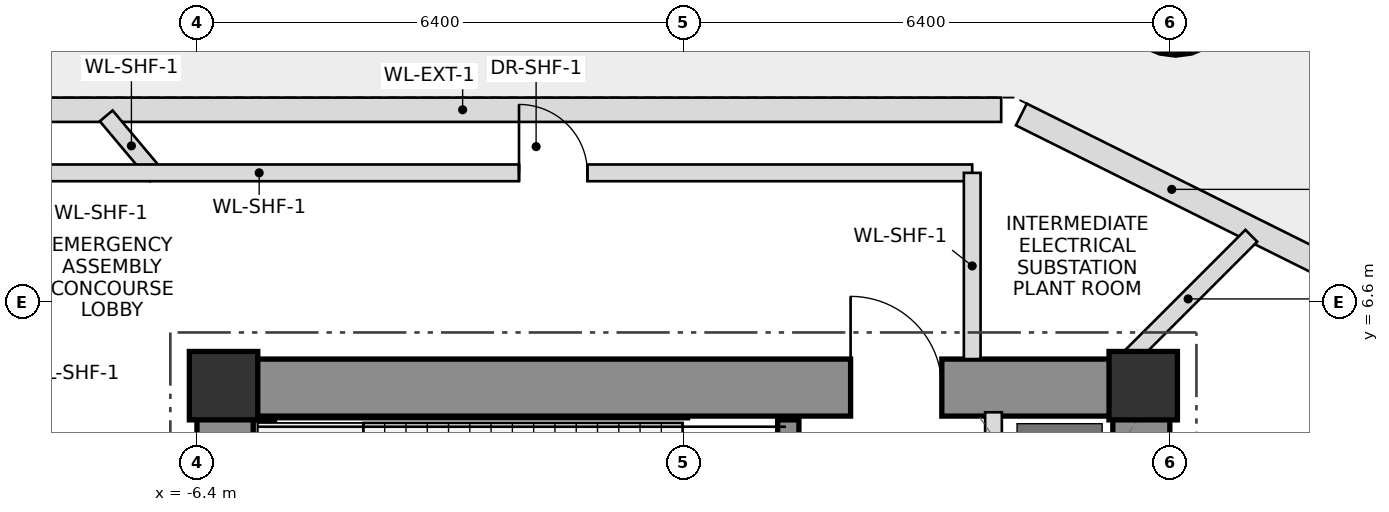
"""IFC4 building model, lengths in metres.
Left out: names, types, materials, properties, quantities, classifications, styles, units other than length and angle.
Written with IfcOpenShell. Run it as: python <this file> out.ifc"""

import sys

from ifc_helpers import new_model, si_unit, direction, frame, frame_2d, origin, origin_2d, place, context, subcontext, project, spatial, rectangle, hollow_circle, extrude, source, transform, mapped, element, fill, save


model = new_model("IFC4")
c1 = context("Model", 3, precision=1e-05, world=origin(), true_north=direction((0.0, 1.0)))
c2 = subcontext(c1, "Body", "Model", "MODEL_VIEW")
j1 = project(units=[si_unit("LENGTHUNIT", "METRE"), si_unit("PLANEANGLEUNIT", "RADIAN")], contexts=[c1])
p1 = place(None, origin())
s1 = spatial("IfcSite", under=j1, at=p1, CompositionType="ELEMENT")
p2 = place(p1, origin())
s2 = spatial("IfcBuilding", under=s1, at=p2, CompositionType="ELEMENT")
p3 = place(p2, frame((0.0, 0.0, 49.7)))
s3 = spatial("IfcBuildingStorey", under=s2, at=p3, CompositionType="ELEMENT", Elevation=49.7)
m1 = source(origin(), c2, "Body", "SweptSolid", [
    extrude(rectangle(XDim=0.9, YDim=0.9, at=origin_2d()), origin(), (0.0, 0.0, 1.0), 5.1),
])
for number, where, z_axis, x_axis in (
    (1, (6.05, 5.5, 0.0), (0.0, 0.0, 1.0), (1.0, 0.0, 0.0)),
    (2, (-6.05, 5.5, 0.0), (0.0, 0.0, 1.0), (1.0, 0.0, 0.0)),
):
    element("IfcColumn", number, at=place(p3, frame(where, z_axis=z_axis, x_axis=x_axis)), inside=s3, PredefinedType="COLUMN", context=c2, shape_type="MappedRepresentation", body=[
        mapped(m1, transform((0.0, 0.0, 0.0), scale=1.0)),
    ])
p4 = place(p3, frame((-6.4, 5.475, 0.0), z_axis=(0.0, 0.0, 1.0), x_axis=(1.0, 0.0, 0.0)))
e3 = element("IfcWall", 3, at=p4, inside=s3, PredefinedType="SHEAR", context=c2, shape_type="SweptSolid", body=[
    extrude(rectangle(XDim=12.8, YDim=0.75, at=frame_2d((6.4, 0.0))), origin(), (0.0, 0.0, 1.0), 5.1),
])
p5 = place(p4, frame((8.6, 0.0, 0.0)))
e4 = element("IfcOpeningElement", 4, at=p5, cuts=e3, PredefinedType="OPENING", context=c2, shape_type="SweptSolid", body=[
    extrude(rectangle(XDim=1.2, YDim=2.2, at=frame_2d((0.6, 1.1))), frame((0.0, 0.385, 0.0), z_axis=(0.0, -1.0, 0.0), x_axis=(1.0, 0.0, 0.0)), (0.0, 0.0, 1.0), 0.77),
])
p6 = place(p3, frame((6.025, -5.1, 0.0), z_axis=(0.0, 0.0, 1.0), x_axis=(0.0, 1.0, 0.0)))
e5 = element("IfcWall", 5, at=p6, inside=s3, PredefinedType="SHEAR", context=c2, shape_type="SweptSolid", body=[
    extrude(rectangle(XDim=10.2, YDim=0.75, at=frame_2d((5.1, 0.0))), origin(), (0.0, 0.0, 1.0), 5.1),
])
p7 = place(p3, frame((-6.025, 1.75, 0.0), z_axis=(0.0, 0.0, 1.0), x_axis=(0.0, 1.0, 0.0)))
e6 = element("IfcWall", 6, at=p7, inside=s3, PredefinedType="SHEAR", context=c2, shape_type="SweptSolid", body=[
    extrude(rectangle(XDim=3.35, YDim=0.75, at=frame_2d((1.675, 0.0))), origin(), (0.0, 0.0, 1.0), 5.1),
])
p8 = place(p3, frame((-5.52, 2.3, 0.0), z_axis=(0.0, 0.0, 1.0), x_axis=(0.0, 1.0, 0.0)))
e7 = element("IfcWall", 7, at=p8, inside=s3, PredefinedType="SHEAR", context=c2, shape_type="SweptSolid", body=[
    extrude(rectangle(XDim=2.75, YDim=0.28, at=frame_2d((1.375, 0.0))), origin(), (0.0, 0.0, 1.0), 5.1),
])
p9 = place(p3, frame((1.38, 4.25, 0.0), z_axis=(0.0, 0.0, 1.0), x_axis=(0.0, 1.0, 0.0)))
e8 = element("IfcWall", 8, at=p9, inside=s3, PredefinedType="SHEAR", context=c2, shape_type="SweptSolid", body=[
    extrude(rectangle(XDim=0.8, YDim=0.28, at=frame_2d((0.4, 0.0))), origin(), (0.0, 0.0, 1.0), 5.1),
])
m2 = source(origin(), c2, "Body", "SweptSolid", [
    extrude(hollow_circle(Radius=0.8, WallThickness=0.055, at=origin_2d()), origin(), (0.0, 0.0, 1.0), 5.0),
])
p10 = place(p3, frame((6.477, 10.648, 0.0), z_axis=(0.0, 0.0, 1.0), x_axis=(1.0, 0.0, 0.0)))
e9 = element("IfcColumn", 9, at=p10, inside=s3, PredefinedType="COLUMN", context=c2, shape_type="MappedRepresentation", body=[
    mapped(m2, transform((0.0, 0.0, 0.0), scale=1.0)),
])
p11 = place(p3, frame((4.08, 2.2, 0.0), z_axis=(0.0, 0.0, 1.0), x_axis=(0.0, 1.0, 0.0)))
e10 = element("IfcWall", 10, at=p11, inside=s3, PredefinedType="PLUMBINGWALL", context=c2, shape_type="SweptSolid", body=[
    extrude(rectangle(XDim=2.95, YDim=0.22, at=frame_2d((1.475, 0.0))), origin(), (0.0, 0.0, 1.0), 4.895),
])
p12 = place(p11, frame((0.75, 0.0, 0.0)))
e11 = element("IfcOpeningElement", 11, at=p12, cuts=e10, PredefinedType="OPENING", context=c2, shape_type="SweptSolid", body=[
    extrude(rectangle(XDim=1.2, YDim=2.25, at=frame_2d((0.6, 1.125))), frame((0.0, 0.12, 0.0), z_axis=(0.0, -1.0, 0.0), x_axis=(1.0, 0.0, 0.0)), (0.0, 0.0, 1.0), 0.24),
])
p13 = place(p3, frame((-9.99, 9.13, 0.0), z_axis=(0.0, 0.0, 1.0), x_axis=(1.0, 0.0, 0.0)))
e12 = element("IfcWall", 12, at=p13, inside=s3, PredefinedType="SOLIDWALL", context=c2, shape_type="SweptSolid", body=[
    extrude(rectangle(XDim=14.171, YDim=0.32, at=frame_2d((7.085, 0.0))), origin(), (0.0, 0.0, 1.0), 4.895),
])
p14 = place(p3, frame((4.447, 9.068, 0.0), z_axis=(0.0, 0.0, 1.0), x_axis=(0.895253931131, -0.445556280164, 0.0)))
e13 = element("IfcWall", 13, at=p14, inside=s3, PredefinedType="SOLIDWALL", context=c2, shape_type="SweptSolid", body=[
    extrude(rectangle(XDim=4.421, YDim=0.32, at=frame_2d((2.211, 0.0))), origin(), (0.0, 0.0, 1.0), 3.55),
])
p15 = place(p3, frame((5.81, 5.81, 0.0), z_axis=(0.0, 0.0, 1.0), x_axis=(0.707106781187, 0.707106781187, 0.0)))
e14 = element("IfcWall", 14, at=p15, inside=s3, PredefinedType="PLUMBINGWALL", context=c2, shape_type="SweptSolid", body=[
    extrude(rectangle(XDim=2.351, YDim=0.22, at=frame_2d((1.175, 0.0))), origin(), (0.0, 0.0, 1.0), 3.55),
])
p16 = place(p3, frame((-6.931, 8.26, 0.0), z_axis=(0.0, 0.0, 1.0), x_axis=(-0.642881168458, 0.765965928251, 0.0)))
e15 = element("IfcWall", 15, at=p16, inside=s3, PredefinedType="PLUMBINGWALL", context=c2, shape_type="SweptSolid", body=[
    extrude(rectangle(XDim=1.031, YDim=0.22, at=frame_2d((0.516, 0.0))), origin(), (0.0, 0.0, 1.0), 4.895),
])
p17 = place(p3, frame((-8.85, 8.3, 0.0), z_axis=(0.0, 0.0, 1.0), x_axis=(1.0, 0.0, 0.0)))
e16 = element("IfcWall", 16, at=p17, inside=s3, PredefinedType="PLUMBINGWALL", context=c2, shape_type="SweptSolid", body=[
    extrude(rectangle(XDim=12.65, YDim=0.22, at=frame_2d((6.325, 0.0))), origin(), (0.0, 0.0, 1.0), 4.895),
])
p18 = place(p17, frame((6.687, 0.0, 0.0)))
e17 = element("IfcOpeningElement", 17, at=p18, cuts=e16, PredefinedType="OPENING", context=c2, shape_type="SweptSolid", body=[
    extrude(rectangle(XDim=0.9, YDim=2.05, at=frame_2d((0.45, 1.025))), frame((0.0, 0.12, 0.0), z_axis=(0.0, -1.0, 0.0), x_axis=(1.0, 0.0, 0.0)), (0.0, 0.0, 1.0), 0.24),
])
p19 = place(p3, frame((3.8, 8.3, 0.0), z_axis=(0.0, 0.0, 1.0), x_axis=(0.0, -1.0, 0.0)))
e18 = element("IfcWall", 18, at=p19, inside=s3, PredefinedType="PLUMBINGWALL", context=c2, shape_type="SweptSolid", body=[
    extrude(rectangle(XDim=2.45, YDim=0.22, at=frame_2d((1.225, 0.0))), origin(), (0.0, 0.0, 1.0), 4.895),
])
p20 = place(p5, origin())
e19 = element("IfcDoor", 19, at=p20, inside=s3, OperationType="SINGLE_SWING_LEFT", PredefinedType="DOOR", context=c2, shape_type="SweptSolid", body=[
    extrude(rectangle(XDim=1.2, YDim=2.2, at=frame_2d((0.6, 1.1))), frame((0.0, 0.025, 0.0), z_axis=(0.0, -1.0, 0.0), x_axis=(1.0, 0.0, 0.0)), (0.0, 0.0, 1.0), 0.05),
])
fill(e4, e19)
p21 = place(p18, origin())
e20 = element("IfcDoor", 20, at=p21, inside=s3, OperationType="SINGLE_SWING_LEFT", PredefinedType="DOOR", context=c2, shape_type="SweptSolid", body=[
    extrude(rectangle(XDim=0.9, YDim=2.05, at=frame_2d((0.45, 1.025))), frame((0.0, 0.025, 0.0), z_axis=(0.0, -1.0, 0.0), x_axis=(1.0, 0.0, 0.0)), (0.0, 0.0, 1.0), 0.05),
])
fill(e17, e20)
save(model, sys.argv[1])
